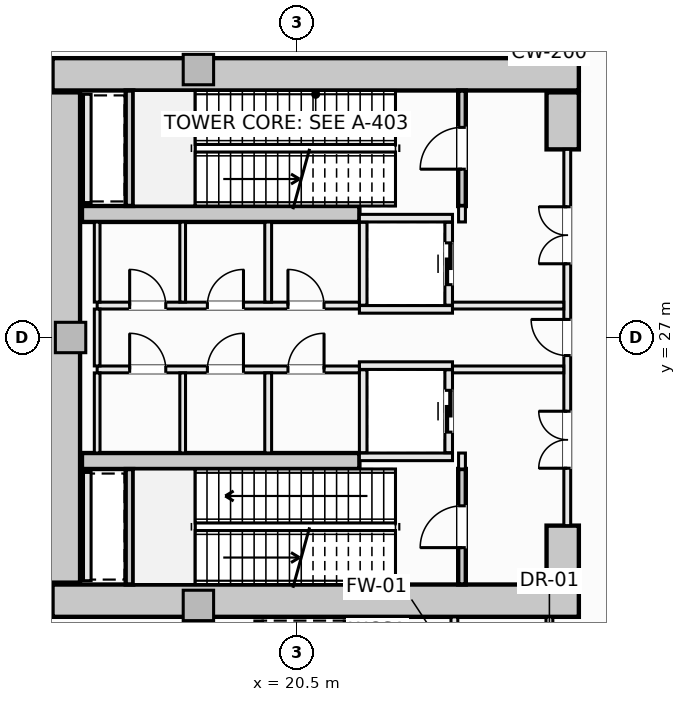
"""IFC4 building model, lengths in metres.
Left out: names, types, materials, properties, quantities, classifications, styles, units other than length and angle.
Written with IfcOpenShell. Run it as: python <this file> out.ifc"""

import sys

from ifc_helpers import new_model, si_unit, direction, frame, frame_2d, origin, origin_2d, place, context, subcontext, project, spatial, rectangle, extrude, element, fill, save


model = new_model("IFC4")
c1 = context("Model", 3, precision=1e-05, world=origin(), true_north=direction((0.0, 1.0)))
c2 = subcontext(c1, "Body", "Model", "MODEL_VIEW")
j1 = project(units=[si_unit("LENGTHUNIT", "METRE"), si_unit("PLANEANGLEUNIT", "RADIAN")], contexts=[c1])
p1 = place(None, origin())
s1 = spatial("IfcSite", under=j1, at=p1, CompositionType="ELEMENT")
p2 = place(p1, origin())
s2 = spatial("IfcBuilding", under=s1, at=p2, CompositionType="ELEMENT")
p3 = place(p2, frame((0.0, 0.0, 15.0)))
s3 = spatial("IfcBuildingStorey", under=s2, at=p3, CompositionType="ELEMENT", Elevation=15.0)
for number, where, z_axis, x_axis in (
    (1, (14.075, 33.925, -0.24), (0.0, 0.0, 1.0), (1.0, 0.0, 0.0)),
    (2, (14.075, 20.075, -0.24), (0.0, 0.0, 1.0), (1.0, 0.0, 0.0)),
):
    element("IfcWall", number, at=place(p3, frame(where, z_axis=z_axis, x_axis=x_axis)), inside=s3, PredefinedType="SHEAR", context=c2, shape_type="SweptSolid", body=[
        extrude(rectangle(XDim=13.85, YDim=0.85, at=frame_2d((6.925, 0.0))), origin(), (0.0, 0.0, 1.0), 6.0),
    ])
p4 = place(p3, frame((14.375, 20.55, -0.24), z_axis=(0.0, 0.0, 1.0), x_axis=(0.0, 1.0, 0.0)))
e3 = element("IfcWall", 3, at=p4, inside=s3, PredefinedType="SHEAR", context=c2, shape_type="SweptSolid", body=[
    extrude(rectangle(XDim=12.9, YDim=0.85, at=frame_2d((6.45, 0.0))), origin(), (0.0, 0.0, 1.0), 6.0),
])
for number, where, z_axis, x_axis in (
    (4, (27.5, 31.95, -0.24), (0.0, 0.0, 1.0), (0.0, 1.0, 0.0)),
    (5, (27.5, 20.55, -0.24), (0.0, 0.0, 1.0), (0.0, 1.0, 0.0)),
):
    element("IfcWall", number, at=place(p3, frame(where, z_axis=z_axis, x_axis=x_axis)), inside=s3, PredefinedType="SHEAR", context=c2, shape_type="SweptSolid", body=[
        extrude(rectangle(XDim=1.5, YDim=0.85, at=frame_2d((0.75, 0.0))), origin(), (0.0, 0.0, 1.0), 6.0),
    ])
for number, where, z_axis, x_axis in (
    (6, (14.85, 30.25, -0.24), (0.0, 0.0, 1.0), (1.0, 0.0, 0.0)),
    (7, (14.85, 23.75, -0.24), (0.0, 0.0, 1.0), (1.0, 0.0, 0.0)),
):
    element("IfcWall", number, at=place(p3, frame(where, z_axis=z_axis, x_axis=x_axis)), inside=s3, PredefinedType="SHEAR", context=c2, shape_type="SweptSolid", body=[
        extrude(rectangle(XDim=7.3, YDim=0.42, at=frame_2d((3.65, 0.0))), origin(), (0.0, 0.0, 1.0), 6.0),
    ])
for number, where, z_axis, x_axis in (
    (8, (17.914, 34.05, -0.24), (0.0, 0.0, 1.0), (1.0, 0.0, 0.0)),
    (9, (14.55, 27.0, -0.24), (0.0, 0.0, 1.0), (1.0, 0.0, 0.0)),
    (10, (17.914, 19.95, -0.24), (0.0, 0.0, 1.0), (1.0, 0.0, 0.0)),
):
    element("IfcColumn", number, at=place(p3, frame(where, z_axis=z_axis, x_axis=x_axis)), inside=s3, PredefinedType="PILASTER", context=c2, shape_type="SweptSolid", body=[
        extrude(rectangle(XDim=0.8, YDim=0.8, at=origin_2d()), origin(), (0.0, 0.0, 1.0), 6.0),
    ])
p5 = place(p3, frame((24.85, 30.46, -0.24), z_axis=(0.0, 0.0, 1.0), x_axis=(0.0, 1.0, 0.0)))
e11 = element("IfcWall", 11, at=p5, inside=s3, PredefinedType="SHEAR", context=c2, shape_type="SweptSolid", body=[
    extrude(rectangle(XDim=3.038, YDim=0.2, at=frame_2d((1.519, 0.0))), origin(), (0.0, 0.0, 1.0), 6.0),
])
p6 = place(p5, frame((0.969, 0.0, 0.24)))
e12 = element("IfcOpeningElement", 12, at=p6, cuts=e11, PredefinedType="OPENING", context=c2, shape_type="SweptSolid", body=[
    extrude(rectangle(XDim=1.1, YDim=2.15, at=frame_2d((0.55, 1.075))), frame((0.0, 0.11, 0.0), z_axis=(0.0, -1.0, 0.0), x_axis=(1.0, 0.0, 0.0)), (0.0, 0.0, 1.0), 0.22),
])
p7 = place(p3, frame((16.1, 30.462, -0.24), z_axis=(0.0, 0.0, 1.0), x_axis=(0.0, 1.0, 0.0)))
e13 = element("IfcWall", 13, at=p7, inside=s3, PredefinedType="SHEAR", context=c2, shape_type="SweptSolid", body=[
    extrude(rectangle(XDim=3.036, YDim=0.2, at=frame_2d((1.518, 0.0))), origin(), (0.0, 0.0, 1.0), 6.0),
])
p8 = place(p3, frame((24.85, 20.502, -0.24), z_axis=(0.0, 0.0, 1.0), x_axis=(0.0, 1.0, 0.0)))
e14 = element("IfcWall", 14, at=p8, inside=s3, PredefinedType="SHEAR", context=c2, shape_type="SweptSolid", body=[
    extrude(rectangle(XDim=3.038, YDim=0.2, at=frame_2d((1.519, 0.0))), origin(), (0.0, 0.0, 1.0), 6.0),
])
p9 = place(p8, frame((0.969, 0.0, 0.24)))
e15 = element("IfcOpeningElement", 15, at=p9, cuts=e14, PredefinedType="OPENING", context=c2, shape_type="SweptSolid", body=[
    extrude(rectangle(XDim=1.1, YDim=2.15, at=frame_2d((0.55, 1.075))), frame((0.0, 0.11, 0.0), z_axis=(0.0, -1.0, 0.0), x_axis=(1.0, 0.0, 0.0)), (0.0, 0.0, 1.0), 0.22),
])
p10 = place(p3, frame((16.1, 20.502, -0.24), z_axis=(0.0, 0.0, 1.0), x_axis=(0.0, 1.0, 0.0)))
e16 = element("IfcWall", 16, at=p10, inside=s3, PredefinedType="SHEAR", context=c2, shape_type="SweptSolid", body=[
    extrude(rectangle(XDim=3.036, YDim=0.2, at=frame_2d((1.518, 0.0))), origin(), (0.0, 0.0, 1.0), 6.0),
])
for number, where, z_axis, x_axis in (
    (17, (22.15, 30.14, 0.0), (0.0, 0.0, 1.0), (1.0, 0.0, 0.0)),
    (18, (22.15, 27.74, 0.0), (0.0, 0.0, 1.0), (1.0, 0.0, 0.0)),
):
    element("IfcWall", number, at=place(p3, frame(where, z_axis=z_axis, x_axis=x_axis)), inside=s3, PredefinedType="SOLIDWALL", context=c2, shape_type="SweptSolid", body=[
        extrude(rectangle(XDim=2.45, YDim=0.2, at=frame_2d((1.225, 0.0))), origin(), (0.0, 0.0, 1.0), 5.76),
    ])
p11 = place(p3, frame((22.25, 27.85, 0.0), z_axis=(0.0, 0.0, 1.0), x_axis=(0.0, 1.0, 0.0)))
e19 = element("IfcWall", 19, at=p11, inside=s3, PredefinedType="SOLIDWALL", context=c2, shape_type="SweptSolid", body=[
    extrude(rectangle(XDim=2.18, YDim=0.2, at=frame_2d((1.09, 0.0))), origin(), (0.0, 0.0, 1.0), 5.76),
])
p12 = place(p3, frame((24.5, 27.85, 0.0), z_axis=(0.0, 0.0, 1.0), x_axis=(0.0, 1.0, 0.0)))
e20 = element("IfcWall", 20, at=p12, inside=s3, PredefinedType="SOLIDWALL", context=c2, shape_type="SweptSolid", body=[
    extrude(rectangle(XDim=2.18, YDim=0.2, at=frame_2d((1.09, 0.0))), origin(), (0.0, 0.0, 1.0), 5.76),
])
p13 = place(p12, frame((0.54, 0.0, 0.0)))
e21 = element("IfcOpeningElement", 21, at=p13, cuts=e20, PredefinedType="OPENING", context=c2, shape_type="SweptSolid", body=[
    extrude(rectangle(XDim=1.1, YDim=2.2, at=frame_2d((0.55, 1.1))), frame((0.0, 0.11, 0.0), z_axis=(0.0, -1.0, 0.0), x_axis=(1.0, 0.0, 0.0)), (0.0, 0.0, 1.0), 0.22),
])
for number, where, z_axis, x_axis in (
    (22, (22.15, 26.26, 0.0), (0.0, 0.0, 1.0), (1.0, 0.0, 0.0)),
    (23, (22.15, 23.86, 0.0), (0.0, 0.0, 1.0), (1.0, 0.0, 0.0)),
):
    element("IfcWall", number, at=place(p3, frame(where, z_axis=z_axis, x_axis=x_axis)), inside=s3, PredefinedType="SOLIDWALL", context=c2, shape_type="SweptSolid", body=[
        extrude(rectangle(XDim=2.45, YDim=0.2, at=frame_2d((1.225, 0.0))), origin(), (0.0, 0.0, 1.0), 5.76),
    ])
p14 = place(p3, frame((22.25, 23.97, 0.0), z_axis=(0.0, 0.0, 1.0), x_axis=(0.0, 1.0, 0.0)))
e24 = element("IfcWall", 24, at=p14, inside=s3, PredefinedType="SOLIDWALL", context=c2, shape_type="SweptSolid", body=[
    extrude(rectangle(XDim=2.18, YDim=0.2, at=frame_2d((1.09, 0.0))), origin(), (0.0, 0.0, 1.0), 5.76),
])
p15 = place(p3, frame((24.5, 23.97, 0.0), z_axis=(0.0, 0.0, 1.0), x_axis=(0.0, 1.0, 0.0)))
e25 = element("IfcWall", 25, at=p15, inside=s3, PredefinedType="SOLIDWALL", context=c2, shape_type="SweptSolid", body=[
    extrude(rectangle(XDim=2.18, YDim=0.2, at=frame_2d((1.09, 0.0))), origin(), (0.0, 0.0, 1.0), 5.76),
])
p16 = place(p15, frame((0.54, 0.0, 0.0)))
e26 = element("IfcOpeningElement", 26, at=p16, cuts=e25, PredefinedType="OPENING", context=c2, shape_type="SweptSolid", body=[
    extrude(rectangle(XDim=1.1, YDim=2.2, at=frame_2d((0.55, 1.1))), frame((0.0, 0.11, 0.0), z_axis=(0.0, -1.0, 0.0), x_axis=(1.0, 0.0, 0.0)), (0.0, 0.0, 1.0), 0.22),
])
for number, where, z_axis, x_axis in (
    (27, (19.5, 17.01, 0.0), (0.0, 0.0, 1.0), (0.0, 1.0, 0.0)),
    (28, (21.85, 17.01, 0.0), (0.0, 0.0, 1.0), (0.0, 1.0, 0.0)),
):
    element("IfcWall", number, at=place(p3, frame(where, z_axis=z_axis, x_axis=x_axis)), inside=s3, PredefinedType="SOLIDWALL", context=c2, shape_type="SweptSolid", body=[
        extrude(rectangle(XDim=2.53, YDim=0.2, at=frame_2d((1.265, 0.0))), origin(), (0.0, 0.0, 1.0), 5.76),
    ])
for number, where, z_axis, x_axis in (
    (29, (14.99, 30.55, 0.0), (0.0, 0.0, 1.0), (0.0, 1.0, 0.0)),
    (30, (14.99, 20.6, 0.0), (0.0, 0.0, 1.0), (0.0, 1.0, 0.0)),
):
    element("IfcWall", number, at=place(p3, frame(where, z_axis=z_axis, x_axis=x_axis)), inside=s3, PredefinedType="SOLIDWALL", context=c2, shape_type="SweptSolid", body=[
        extrude(rectangle(XDim=2.85, YDim=0.2, at=frame_2d((1.425, 0.0))), origin(), (0.0, 0.0, 1.0), 5.76),
    ])
for number, where, z_axis, x_axis in (
    (31, (24.85, 23.54, 0.0), (0.0, 0.0, 1.0), (0.0, 1.0, 0.0)),
    (32, (24.85, 30.04, 0.0), (0.0, 0.0, 1.0), (0.0, 1.0, 0.0)),
):
    element("IfcWall", number, at=place(p3, frame(where, z_axis=z_axis, x_axis=x_axis)), inside=s3, PredefinedType="SOLIDWALL", context=c2, shape_type="SweptSolid", body=[
        extrude(rectangle(XDim=0.42, YDim=0.18, at=frame_2d((0.21, 0.0))), origin(), (0.0, 0.0, 1.0), 5.76),
    ])
p17 = place(p3, frame((27.62, 22.05, 0.0), z_axis=(0.0, 0.0, 1.0), x_axis=(0.0, 1.0, 0.0)))
e33 = element("IfcWall", 33, at=p17, inside=s3, PredefinedType="SOLIDWALL", context=c2, shape_type="SweptSolid", body=[
    extrude(rectangle(XDim=9.9, YDim=0.18, at=frame_2d((4.95, 0.0))), origin(), (0.0, 0.0, 1.0), 4.852),
])
p18 = place(p17, frame((4.475, 0.0, 0.0)))
e34 = element("IfcOpeningElement", 34, at=p18, cuts=e33, PredefinedType="OPENING", context=c2, shape_type="SweptSolid", body=[
    extrude(rectangle(XDim=0.95, YDim=2.1, at=frame_2d((0.475, 1.05))), frame((0.0, 0.1, 0.0), z_axis=(0.0, -1.0, 0.0), x_axis=(1.0, 0.0, 0.0)), (0.0, 0.0, 1.0), 0.2),
])
p19 = place(p17, frame((6.89, 0.0, 0.0)))
e35 = element("IfcOpeningElement", 35, at=p19, cuts=e33, PredefinedType="OPENING", context=c2, shape_type="SweptSolid", body=[
    extrude(rectangle(XDim=1.5, YDim=2.2, at=frame_2d((0.75, 1.1))), frame((0.0, 0.1, 0.0), z_axis=(0.0, -1.0, 0.0), x_axis=(1.0, 0.0, 0.0)), (0.0, 0.0, 1.0), 0.2),
])
p20 = place(p17, frame((1.51, 0.0, 0.0)))
e36 = element("IfcOpeningElement", 36, at=p20, cuts=e33, PredefinedType="OPENING", context=c2, shape_type="SweptSolid", body=[
    extrude(rectangle(XDim=1.5, YDim=2.2, at=frame_2d((0.75, 1.1))), frame((0.0, 0.1, 0.0), z_axis=(0.0, -1.0, 0.0), x_axis=(1.0, 0.0, 0.0)), (0.0, 0.0, 1.0), 0.2),
])
p21 = place(p3, frame((15.25, 27.84, 0.0), z_axis=(0.0, 0.0, 1.0), x_axis=(1.0, 0.0, 0.0)))
e37 = element("IfcWall", 37, at=p21, inside=s3, PredefinedType="SOLIDWALL", context=c2, shape_type="SweptSolid", body=[
    extrude(rectangle(XDim=6.9, YDim=0.18, at=frame_2d((3.45, 0.0))), origin(), (0.0, 0.0, 1.0), 5.76),
])
p22 = place(p21, frame((5.02, 0.0, 0.0)))
e38 = element("IfcOpeningElement", 38, at=p22, cuts=e37, PredefinedType="OPENING", context=c2, shape_type="SweptSolid", body=[
    extrude(rectangle(XDim=0.95, YDim=2.1, at=frame_2d((0.475, 1.05))), frame((0.0, 0.1, 0.0), z_axis=(0.0, -1.0, 0.0), x_axis=(1.0, 0.0, 0.0)), (0.0, 0.0, 1.0), 0.2),
])
p23 = place(p21, frame((0.855, 0.0, 0.0)))
e39 = element("IfcOpeningElement", 39, at=p23, cuts=e37, PredefinedType="OPENING", context=c2, shape_type="SweptSolid", body=[
    extrude(rectangle(XDim=0.95, YDim=2.1, at=frame_2d((0.475, 1.05))), frame((0.0, 0.1, 0.0), z_axis=(0.0, -1.0, 0.0), x_axis=(1.0, 0.0, 0.0)), (0.0, 0.0, 1.0), 0.2),
])
p24 = place(p21, frame((2.9, 0.0, 0.0)))
e40 = element("IfcOpeningElement", 40, at=p24, cuts=e37, PredefinedType="OPENING", context=c2, shape_type="SweptSolid", body=[
    extrude(rectangle(XDim=0.95, YDim=2.1, at=frame_2d((0.475, 1.05))), frame((0.0, 0.1, 0.0), z_axis=(0.0, -1.0, 0.0), x_axis=(1.0, 0.0, 0.0)), (0.0, 0.0, 1.0), 0.2),
])
p25 = place(p3, frame((24.6, 27.84, 0.0), z_axis=(0.0, 0.0, 1.0), x_axis=(1.0, 0.0, 0.0)))
e41 = element("IfcWall", 41, at=p25, inside=s3, PredefinedType="SOLIDWALL", context=c2, shape_type="SweptSolid", body=[
    extrude(rectangle(XDim=2.928, YDim=0.18, at=frame_2d((1.464, 0.0))), origin(), (0.0, 0.0, 1.0), 5.76),
])
p26 = place(p3, frame((15.25, 26.16, 0.0), z_axis=(0.0, 0.0, 1.0), x_axis=(1.0, 0.0, 0.0)))
e42 = element("IfcWall", 42, at=p26, inside=s3, PredefinedType="SOLIDWALL", context=c2, shape_type="SweptSolid", body=[
    extrude(rectangle(XDim=6.9, YDim=0.18, at=frame_2d((3.45, 0.0))), origin(), (0.0, 0.0, 1.0), 5.76),
])
p27 = place(p26, frame((5.02, 0.0, 0.0)))
e43 = element("IfcOpeningElement", 43, at=p27, cuts=e42, PredefinedType="OPENING", context=c2, shape_type="SweptSolid", body=[
    extrude(rectangle(XDim=0.95, YDim=2.1, at=frame_2d((0.475, 1.05))), frame((0.0, 0.1, 0.0), z_axis=(0.0, -1.0, 0.0), x_axis=(1.0, 0.0, 0.0)), (0.0, 0.0, 1.0), 0.2),
])
p28 = place(p26, frame((0.855, 0.0, 0.0)))
e44 = element("IfcOpeningElement", 44, at=p28, cuts=e42, PredefinedType="OPENING", context=c2, shape_type="SweptSolid", body=[
    extrude(rectangle(XDim=0.95, YDim=2.1, at=frame_2d((0.475, 1.05))), frame((0.0, 0.1, 0.0), z_axis=(0.0, -1.0, 0.0), x_axis=(1.0, 0.0, 0.0)), (0.0, 0.0, 1.0), 0.2),
])
p29 = place(p26, frame((2.9, 0.0, 0.0)))
e45 = element("IfcOpeningElement", 45, at=p29, cuts=e42, PredefinedType="OPENING", context=c2, shape_type="SweptSolid", body=[
    extrude(rectangle(XDim=0.95, YDim=2.1, at=frame_2d((0.475, 1.05))), frame((0.0, 0.1, 0.0), z_axis=(0.0, -1.0, 0.0), x_axis=(1.0, 0.0, 0.0)), (0.0, 0.0, 1.0), 0.2),
])
p30 = place(p3, frame((24.6, 26.16, 0.0), z_axis=(0.0, 0.0, 1.0), x_axis=(1.0, 0.0, 0.0)))
e46 = element("IfcWall", 46, at=p30, inside=s3, PredefinedType="SOLIDWALL", context=c2, shape_type="SweptSolid", body=[
    extrude(rectangle(XDim=2.928, YDim=0.18, at=frame_2d((1.464, 0.0))), origin(), (0.0, 0.0, 1.0), 5.76),
])
p31 = place(p3, frame((15.25, 23.962, 0.0), z_axis=(0.0, 0.0, 1.0), x_axis=(0.0, 1.0, 0.0)))
e47 = element("IfcWall", 47, at=p31, inside=s3, PredefinedType="PARTITIONING", context=c2, shape_type="SweptSolid", body=[
    extrude(rectangle(XDim=2.106, YDim=0.15, at=frame_2d((1.053, 0.0))), origin(), (0.0, 0.0, 1.0), 5.76),
])
p32 = place(p3, frame((15.25, 26.252, 0.0), z_axis=(0.0, 0.0, 1.0), x_axis=(0.0, 1.0, 0.0)))
e48 = element("IfcWall", 48, at=p32, inside=s3, PredefinedType="PARTITIONING", context=c2, shape_type="SweptSolid", body=[
    extrude(rectangle(XDim=1.496, YDim=0.15, at=frame_2d((0.748, 0.0))), origin(), (0.0, 0.0, 1.0), 5.76),
])
p33 = place(p3, frame((15.25, 27.932, 0.0), z_axis=(0.0, 0.0, 1.0), x_axis=(0.0, 1.0, 0.0)))
e49 = element("IfcWall", 49, at=p33, inside=s3, PredefinedType="PARTITIONING", context=c2, shape_type="SweptSolid", body=[
    extrude(rectangle(XDim=2.106, YDim=0.15, at=frame_2d((1.053, 0.0))), origin(), (0.0, 0.0, 1.0), 5.76),
])
for number, where, z_axis, x_axis in (
    (50, (19.75, 23.962, 0.0), (0.0, 0.0, 1.0), (0.0, 1.0, 0.0)),
    (51, (19.75, 27.932, 0.0), (0.0, 0.0, 1.0), (0.0, 1.0, 0.0)),
):
    element("IfcWall", number, at=place(p3, frame(where, z_axis=z_axis, x_axis=x_axis)), inside=s3, PredefinedType="SOLIDWALL", context=c2, shape_type="SweptSolid", body=[
        extrude(rectangle(XDim=2.106, YDim=0.18, at=frame_2d((1.053, 0.0))), origin(), (0.0, 0.0, 1.0), 5.76),
    ])
for number, where, z_axis, x_axis in (
    (52, (17.5, 23.962, 0.0), (0.0, 0.0, 1.0), (0.0, 1.0, 0.0)),
    (53, (17.5, 27.932, 0.0), (0.0, 0.0, 1.0), (0.0, 1.0, 0.0)),
):
    element("IfcWall", number, at=place(p3, frame(where, z_axis=z_axis, x_axis=x_axis)), inside=s3, PredefinedType="PARTITIONING", context=c2, shape_type="SweptSolid", body=[
        extrude(rectangle(XDim=2.106, YDim=0.15, at=frame_2d((1.053, 0.0))), origin(), (0.0, 0.0, 1.0), 5.76),
    ])
p34 = place(p3, frame((22.15, 17.142, 0.0), z_axis=(0.0, 0.0, 1.0), x_axis=(0.0, 1.0, 0.0)))
e54 = element("IfcWall", 54, at=p34, inside=s3, PredefinedType="PARTITIONING", context=c2, shape_type="SweptSolid", body=[
    extrude(rectangle(XDim=2.506, YDim=0.15, at=frame_2d((1.253, 0.0))), origin(), (0.0, 0.0, 1.0), 5.76),
])
p35 = place(p3, frame((24.65, 17.142, 0.0), z_axis=(0.0, 0.0, 1.0), x_axis=(0.0, 1.0, 0.0)))
e55 = element("IfcWall", 55, at=p35, inside=s3, PredefinedType="SOLIDWALL", context=c2, shape_type="SweptSolid", body=[
    extrude(rectangle(XDim=2.506, YDim=0.18, at=frame_2d((1.253, 0.0))), origin(), (0.0, 0.0, 1.0), 5.76),
])
p36 = place(p35, frame((0.778, 0.0, 0.0)))
e56 = element("IfcOpeningElement", 56, at=p36, cuts=e55, PredefinedType="OPENING", context=c2, shape_type="SweptSolid", body=[
    extrude(rectangle(XDim=0.95, YDim=2.1, at=frame_2d((0.475, 1.05))), frame((0.0, 0.1, 0.0), z_axis=(0.0, -1.0, 0.0), x_axis=(1.0, 0.0, 0.0)), (0.0, 0.0, 1.0), 0.2),
])
p37 = place(p3, frame((27.15, 17.142, 0.0), z_axis=(0.0, 0.0, 1.0), x_axis=(0.0, 1.0, 0.0)))
e57 = element("IfcWall", 57, at=p37, inside=s3, PredefinedType="SOLIDWALL", context=c2, shape_type="SweptSolid", body=[
    extrude(rectangle(XDim=2.506, YDim=0.18, at=frame_2d((1.253, 0.0))), origin(), (0.0, 0.0, 1.0), 5.76),
])
p38 = place(p37, frame((0.778, 0.0, 0.0)))
e58 = element("IfcOpeningElement", 58, at=p38, cuts=e57, PredefinedType="OPENING", context=c2, shape_type="SweptSolid", body=[
    extrude(rectangle(XDim=0.95, YDim=2.1, at=frame_2d((0.475, 1.05))), frame((0.0, 0.1, 0.0), z_axis=(0.0, -1.0, 0.0), x_axis=(1.0, 0.0, 0.0)), (0.0, 0.0, 1.0), 0.2),
])
p39 = place(p3, frame((27.25, 34.352, 0.0), z_axis=(0.0, 0.0, 1.0), x_axis=(0.0, 1.0, 0.0)))
e59 = element("IfcWall", 59, at=p39, inside=s3, PredefinedType="PARTITIONING", context=c2, shape_type="SweptSolid", body=[
    extrude(rectangle(XDim=0.606, YDim=0.12, at=frame_2d((0.303, 0.0))), origin(), (0.0, 0.0, 1.0), 5.76),
])
p40 = place(p6, origin())
e60 = element("IfcDoor", 60, at=p40, inside=s3, OperationType="SINGLE_SWING_LEFT", PredefinedType="DOOR", context=c2, shape_type="SweptSolid", body=[
    extrude(rectangle(XDim=1.1, YDim=2.15, at=frame_2d((0.55, 1.075))), frame((0.0, 0.025, 0.0), z_axis=(0.0, -1.0, 0.0), x_axis=(1.0, 0.0, 0.0)), (0.0, 0.0, 1.0), 0.05),
])
fill(e12, e60)
p41 = place(p9, origin())
e61 = element("IfcDoor", 61, at=p41, inside=s3, OperationType="SINGLE_SWING_LEFT", PredefinedType="DOOR", context=c2, shape_type="SweptSolid", body=[
    extrude(rectangle(XDim=1.1, YDim=2.15, at=frame_2d((0.55, 1.075))), frame((0.0, 0.025, 0.0), z_axis=(0.0, -1.0, 0.0), x_axis=(1.0, 0.0, 0.0)), (0.0, 0.0, 1.0), 0.05),
])
fill(e15, e61)
p42 = place(p13, origin())
e62 = element("IfcDoor", 62, at=p42, inside=s3, OperationType="SLIDING_TO_LEFT", PredefinedType="DOOR", context=c2, shape_type="SweptSolid", body=[
    extrude(rectangle(XDim=1.1, YDim=2.2, at=frame_2d((0.55, 1.1))), frame((0.0, 0.025, 0.0), z_axis=(0.0, -1.0, 0.0), x_axis=(1.0, 0.0, 0.0)), (0.0, 0.0, 1.0), 0.05),
])
fill(e21, e62)
p43 = place(p16, origin())
e63 = element("IfcDoor", 63, at=p43, inside=s3, OperationType="SLIDING_TO_LEFT", PredefinedType="DOOR", context=c2, shape_type="SweptSolid", body=[
    extrude(rectangle(XDim=1.1, YDim=2.2, at=frame_2d((0.55, 1.1))), frame((0.0, 0.025, 0.0), z_axis=(0.0, -1.0, 0.0), x_axis=(1.0, 0.0, 0.0)), (0.0, 0.0, 1.0), 0.05),
])
fill(e26, e63)
p44 = place(p18, origin())
e64 = element("IfcDoor", 64, at=p44, inside=s3, OperationType="SINGLE_SWING_RIGHT", PredefinedType="DOOR", context=c2, shape_type="SweptSolid", body=[
    extrude(rectangle(XDim=0.95, YDim=2.1, at=frame_2d((0.475, 1.05))), frame((0.0, 0.025, 0.0), z_axis=(0.0, -1.0, 0.0), x_axis=(1.0, 0.0, 0.0)), (0.0, 0.0, 1.0), 0.05),
])
fill(e34, e64)
p45 = place(p19, origin())
e65 = element("IfcDoor", 65, at=p45, inside=s3, OperationType="DOUBLE_DOOR_SINGLE_SWING", PredefinedType="DOOR", context=c2, shape_type="SweptSolid", body=[
    extrude(rectangle(XDim=1.5, YDim=2.2, at=frame_2d((0.75, 1.1))), frame((0.0, 0.025, 0.0), z_axis=(0.0, -1.0, 0.0), x_axis=(1.0, 0.0, 0.0)), (0.0, 0.0, 1.0), 0.05),
])
fill(e35, e65)
p46 = place(p20, origin())
e66 = element("IfcDoor", 66, at=p46, inside=s3, OperationType="DOUBLE_DOOR_SINGLE_SWING", PredefinedType="DOOR", context=c2, shape_type="SweptSolid", body=[
    extrude(rectangle(XDim=1.5, YDim=2.2, at=frame_2d((0.75, 1.1))), frame((0.0, 0.025, 0.0), z_axis=(0.0, -1.0, 0.0), x_axis=(1.0, 0.0, 0.0)), (0.0, 0.0, 1.0), 0.05),
])
fill(e36, e66)
p47 = place(p22, origin())
e67 = element("IfcDoor", 67, at=p47, inside=s3, OperationType="SINGLE_SWING_LEFT", PredefinedType="DOOR", context=c2, shape_type="SweptSolid", body=[
    extrude(rectangle(XDim=0.95, YDim=2.1, at=frame_2d((0.475, 1.05))), frame((0.0, 0.025, 0.0), z_axis=(0.0, -1.0, 0.0), x_axis=(1.0, 0.0, 0.0)), (0.0, 0.0, 1.0), 0.05),
])
fill(e38, e67)
p48 = place(p27, origin())
e68 = element("IfcDoor", 68, at=p48, inside=s3, OperationType="SINGLE_SWING_RIGHT", PredefinedType="DOOR", context=c2, shape_type="SweptSolid", body=[
    extrude(rectangle(XDim=0.95, YDim=2.1, at=frame_2d((0.475, 1.05))), frame((0.0, 0.025, 0.0), z_axis=(0.0, -1.0, 0.0), x_axis=(1.0, 0.0, 0.0)), (0.0, 0.0, 1.0), 0.05),
])
fill(e43, e68)
p49 = place(p23, origin())
e69 = element("IfcDoor", 69, at=p49, inside=s3, OperationType="SINGLE_SWING_LEFT", PredefinedType="DOOR", context=c2, shape_type="SweptSolid", body=[
    extrude(rectangle(XDim=0.95, YDim=2.1, at=frame_2d((0.475, 1.05))), frame((0.0, 0.025, 0.0), z_axis=(0.0, -1.0, 0.0), x_axis=(1.0, 0.0, 0.0)), (0.0, 0.0, 1.0), 0.05),
])
fill(e39, e69)
p50 = place(p24, origin())
e70 = element("IfcDoor", 70, at=p50, inside=s3, OperationType="SINGLE_SWING_RIGHT", PredefinedType="DOOR", context=c2, shape_type="SweptSolid", body=[
    extrude(rectangle(XDim=0.95, YDim=2.1, at=frame_2d((0.475, 1.05))), frame((0.0, 0.025, 0.0), z_axis=(0.0, -1.0, 0.0), x_axis=(1.0, 0.0, 0.0)), (0.0, 0.0, 1.0), 0.05),
])
fill(e40, e70)
p51 = place(p28, origin())
e71 = element("IfcDoor", 71, at=p51, inside=s3, OperationType="SINGLE_SWING_LEFT", PredefinedType="DOOR", context=c2, shape_type="SweptSolid", body=[
    extrude(rectangle(XDim=0.95, YDim=2.1, at=frame_2d((0.475, 1.05))), frame((0.0, 0.025, 0.0), z_axis=(0.0, -1.0, 0.0), x_axis=(1.0, 0.0, 0.0)), (0.0, 0.0, 1.0), 0.05),
])
fill(e44, e71)
p52 = place(p29, origin())
e72 = element("IfcDoor", 72, at=p52, inside=s3, OperationType="SINGLE_SWING_RIGHT", PredefinedType="DOOR", context=c2, shape_type="SweptSolid", body=[
    extrude(rectangle(XDim=0.95, YDim=2.1, at=frame_2d((0.475, 1.05))), frame((0.0, 0.025, 0.0), z_axis=(0.0, -1.0, 0.0), x_axis=(1.0, 0.0, 0.0)), (0.0, 0.0, 1.0), 0.05),
])
fill(e45, e72)
save(model, sys.argv[1])
